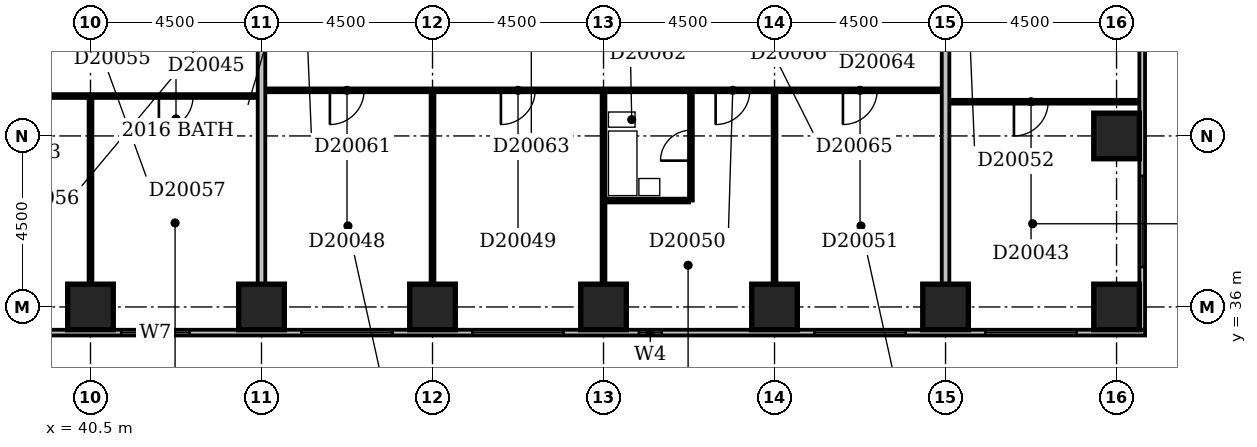
"""IFC4 building model, lengths in metres.
Left out: names, types, materials, properties, quantities, classifications, styles, units other than length and angle.
Written with IfcOpenShell. Run it as: python <this file> out.ifc"""

import sys

from ifc_helpers import new_model, si_unit, direction, frame, frame_2d, origin, origin_2d, place, context, subcontext, project, spatial, rectangle, extrude, element, fill, save


model = new_model("IFC4")
c1 = context("Model", 3, precision=1e-05, world=origin(), true_north=direction((0.0, 1.0)))
c2 = subcontext(c1, "Body", "Model", "MODEL_VIEW")
j1 = project(units=[si_unit("LENGTHUNIT", "METRE"), si_unit("PLANEANGLEUNIT", "RADIAN")], contexts=[c1])
p1 = place(None, origin())
s1 = spatial("IfcSite", under=j1, at=p1, CompositionType="ELEMENT")
p2 = place(p1, origin())
s2 = spatial("IfcBuilding", under=s1, at=p2, CompositionType="ELEMENT")
p3 = place(p2, frame((0.0, 0.0, 83.0)))
s3 = spatial("IfcBuildingStorey", under=s2, at=p3, CompositionType="ELEMENT", Elevation=83.0)
for number, where, z_axis, x_axis in (
    (1, (40.5, 36.0, -0.3), (0.0, 0.0, 1.0), (1.0, 0.0, 0.0)),
    (2, (45.0, 36.0, -0.3), (0.0, 0.0, 1.0), (1.0, 0.0, 0.0)),
    (3, (49.5, 36.0, -0.3), (0.0, 0.0, 1.0), (1.0, 0.0, 0.0)),
    (4, (54.0, 36.0, -0.3), (0.0, 0.0, 1.0), (1.0, 0.0, 0.0)),
    (5, (58.5, 36.0, -0.3), (0.0, 0.0, 1.0), (1.0, 0.0, 0.0)),
    (6, (63.0, 36.0, -0.3), (0.0, 0.0, 1.0), (1.0, 0.0, 0.0)),
    (7, (67.5, 36.0, -0.3), (0.0, 0.0, 1.0), (1.0, 0.0, 0.0)),
    (8, (67.5, 40.5, -0.3), (0.0, 0.0, 1.0), (1.0, 0.0, 0.0)),
):
    element("IfcColumn", number, at=place(p3, frame(where, z_axis=z_axis, x_axis=x_axis)), inside=s3, PredefinedType="COLUMN", context=c2, shape_type="SweptSolid", body=[
        extrude(rectangle(XDim=1.2, YDim=1.2, at=origin_2d()), origin(), (0.0, 0.0, 1.0), 3.6),
    ])
p4 = place(p3, frame((23.1, 35.325, 0.0), z_axis=(0.0, 0.0, 1.0), x_axis=(1.0, 0.0, 0.0)))
e9 = element("IfcWall", 9, at=p4, inside=s3, PredefinedType="STANDARD", context=c2, shape_type="SweptSolid", body=[
    extrude(rectangle(XDim=45.15, YDim=0.15, at=frame_2d((22.575, 0.0))), origin(), (0.0, 0.0, 1.0), 2.7),
])
p5 = place(p4, frame((0.45, 0.0, 0.6)))
e10 = element("IfcOpeningElement", 10, at=p5, cuts=e9, PredefinedType="OPENING", context=c2, shape_type="SweptSolid", body=[
    extrude(rectangle(XDim=2.4, YDim=1.8, at=frame_2d((1.2, 0.9))), frame((0.0, 0.087, 0.0), z_axis=(0.0, -1.0, 0.0), x_axis=(1.0, 0.0, 0.0)), (0.0, 0.0, 1.0), 0.174),
])
p6 = place(p4, frame((6.366, 0.0, 0.6)))
e11 = element("IfcOpeningElement", 11, at=p6, cuts=e9, PredefinedType="OPENING", context=c2, shape_type="SweptSolid", body=[
    extrude(rectangle(XDim=1.2, YDim=1.8, at=frame_2d((0.6, 0.9))), frame((0.0, 0.087, 0.0), z_axis=(0.0, -1.0, 0.0), x_axis=(1.0, 0.0, 0.0)), (0.0, 0.0, 1.0), 0.174),
])
p7 = place(p4, frame((9.45, 0.0, 0.6)))
e12 = element("IfcOpeningElement", 12, at=p7, cuts=e9, PredefinedType="OPENING", context=c2, shape_type="SweptSolid", body=[
    extrude(rectangle(XDim=2.4, YDim=1.8, at=frame_2d((1.2, 0.9))), frame((0.0, 0.087, 0.0), z_axis=(0.0, -1.0, 0.0), x_axis=(1.0, 0.0, 0.0)), (0.0, 0.0, 1.0), 0.174),
])
p8 = place(p4, frame((13.95, 0.0, 0.6)))
e13 = element("IfcOpeningElement", 13, at=p8, cuts=e9, PredefinedType="OPENING", context=c2, shape_type="SweptSolid", body=[
    extrude(rectangle(XDim=2.4, YDim=1.8, at=frame_2d((1.2, 0.9))), frame((0.0, 0.087, 0.0), z_axis=(0.0, -1.0, 0.0), x_axis=(1.0, 0.0, 0.0)), (0.0, 0.0, 1.0), 0.174),
])
p9 = place(p4, frame((18.21, 0.0, 0.6)))
e14 = element("IfcOpeningElement", 14, at=p9, cuts=e9, PredefinedType="OPENING", context=c2, shape_type="SweptSolid", body=[
    extrude(rectangle(XDim=1.8, YDim=1.8, at=frame_2d((0.9, 0.9))), frame((0.0, 0.087, 0.0), z_axis=(0.0, -1.0, 0.0), x_axis=(1.0, 0.0, 0.0)), (0.0, 0.0, 1.0), 0.174),
])
p10 = place(p4, frame((22.95, 0.0, 0.6)))
e15 = element("IfcOpeningElement", 15, at=p10, cuts=e9, PredefinedType="OPENING", context=c2, shape_type="SweptSolid", body=[
    extrude(rectangle(XDim=2.4, YDim=1.8, at=frame_2d((1.2, 0.9))), frame((0.0, 0.087, 0.0), z_axis=(0.0, -1.0, 0.0), x_axis=(1.0, 0.0, 0.0)), (0.0, 0.0, 1.0), 0.174),
])
p11 = place(p4, frame((27.45, 0.0, 0.6)))
e16 = element("IfcOpeningElement", 16, at=p11, cuts=e9, PredefinedType="OPENING", context=c2, shape_type="SweptSolid", body=[
    extrude(rectangle(XDim=2.4, YDim=1.8, at=frame_2d((1.2, 0.9))), frame((0.0, 0.087, 0.0), z_axis=(0.0, -1.0, 0.0), x_axis=(1.0, 0.0, 0.0)), (0.0, 0.0, 1.0), 0.174),
])
p12 = place(p4, frame((31.831, 0.0, 0.6)))
e17 = element("IfcOpeningElement", 17, at=p12, cuts=e9, PredefinedType="OPENING", context=c2, shape_type="SweptSolid", body=[
    extrude(rectangle(XDim=0.6, YDim=1.8, at=frame_2d((0.3, 0.9))), frame((0.0, 0.087, 0.0), z_axis=(0.0, -1.0, 0.0), x_axis=(1.0, 0.0, 0.0)), (0.0, 0.0, 1.0), 0.174),
])
p13 = place(p4, frame((36.45, 0.0, 0.6)))
e18 = element("IfcOpeningElement", 18, at=p13, cuts=e9, PredefinedType="OPENING", context=c2, shape_type="SweptSolid", body=[
    extrude(rectangle(XDim=2.4, YDim=1.8, at=frame_2d((1.2, 0.9))), frame((0.0, 0.087, 0.0), z_axis=(0.0, -1.0, 0.0), x_axis=(1.0, 0.0, 0.0)), (0.0, 0.0, 1.0), 0.174),
])
p14 = place(p4, frame((40.95, 0.0, 0.6)))
e19 = element("IfcOpeningElement", 19, at=p14, cuts=e9, PredefinedType="OPENING", context=c2, shape_type="SweptSolid", body=[
    extrude(rectangle(XDim=2.4, YDim=1.8, at=frame_2d((1.2, 0.9))), frame((0.0, 0.087, 0.0), z_axis=(0.0, -1.0, 0.0), x_axis=(1.0, 0.0, 0.0)), (0.0, 0.0, 1.0), 0.174),
])
p15 = place(p3, frame((68.175, 35.4, 0.0), z_axis=(0.0, 0.0, 1.0), x_axis=(0.0, 1.0, 0.0)))
e20 = element("IfcWall", 20, at=p15, inside=s3, PredefinedType="STANDARD", context=c2, shape_type="SweptSolid", body=[
    extrude(rectangle(XDim=23.85, YDim=0.15, at=frame_2d((11.925, 0.0))), origin(), (0.0, 0.0, 1.0), 2.7),
])
p16 = place(p15, frame((1.65, 0.0, 0.6)))
e21 = element("IfcOpeningElement", 21, at=p16, cuts=e20, PredefinedType="OPENING", context=c2, shape_type="SweptSolid", body=[
    extrude(rectangle(XDim=2.4, YDim=1.8, at=frame_2d((1.2, 0.9))), frame((0.0, 0.087, 0.0), z_axis=(0.0, -1.0, 0.0), x_axis=(1.0, 0.0, 0.0)), (0.0, 0.0, 1.0), 0.174),
])
p17 = place(p3, frame((40.5, 36.6, 0.0), z_axis=(0.0, 0.0, 1.0), x_axis=(0.0, 1.0, 0.0)))
e22 = element("IfcWall", 22, at=p17, inside=s3, PredefinedType="PARTITIONING", context=c2, shape_type="SweptSolid", body=[
    extrude(rectangle(XDim=4.9, YDim=0.1, at=frame_2d((2.45, 0.0))), origin(), (0.0, 0.0, 1.0), 3.3),
])
p18 = place(p3, frame((45.0, 36.6, 0.0), z_axis=(0.0, 0.0, 1.0), x_axis=(0.0, 1.0, 0.0)))
e23 = element("IfcWall", 23, at=p18, inside=s3, PredefinedType="PARTITIONING", context=c2, shape_type="SweptSolid", body=[
    extrude(rectangle(XDim=12.8, YDim=0.2, at=frame_2d((6.4, 0.0))), origin(), (0.0, 0.0, 1.0), 2.6),
])
p19 = place(p3, frame((49.5, 36.6, 0.0), z_axis=(0.0, 0.0, 1.0), x_axis=(0.0, 1.0, 0.0)))
e24 = element("IfcWall", 24, at=p19, inside=s3, PredefinedType="PARTITIONING", context=c2, shape_type="SweptSolid", body=[
    extrude(rectangle(XDim=5.05, YDim=0.1, at=frame_2d((2.525, 0.0))), origin(), (0.0, 0.0, 1.0), 3.3),
])
p20 = place(p3, frame((54.0, 36.6, 0.0), z_axis=(0.0, 0.0, 1.0), x_axis=(0.0, 1.0, 0.0)))
e25 = element("IfcWall", 25, at=p20, inside=s3, PredefinedType="PARTITIONING", context=c2, shape_type="SweptSolid", body=[
    extrude(rectangle(XDim=5.05, YDim=0.1, at=frame_2d((2.525, 0.0))), origin(), (0.0, 0.0, 1.0), 2.6),
])
p21 = place(p3, frame((58.5, 36.6, 0.0), z_axis=(0.0, 0.0, 1.0), x_axis=(0.0, 1.0, 0.0)))
e26 = element("IfcWall", 26, at=p21, inside=s3, PredefinedType="PARTITIONING", context=c2, shape_type="SweptSolid", body=[
    extrude(rectangle(XDim=5.05, YDim=0.1, at=frame_2d((2.525, 0.0))), origin(), (0.0, 0.0, 1.0), 3.3),
])
p22 = place(p3, frame((63.0, 36.6, 0.0), z_axis=(0.0, 0.0, 1.0), x_axis=(0.0, 1.0, 0.0)))
e27 = element("IfcWall", 27, at=p22, inside=s3, PredefinedType="PARTITIONING", context=c2, shape_type="SweptSolid", body=[
    extrude(rectangle(XDim=12.8, YDim=0.2, at=frame_2d((6.4, 0.0))), origin(), (0.0, 0.0, 1.0), 2.4),
])
p23 = place(p3, frame((54.05, 38.8, 0.0), z_axis=(0.0, 0.0, 1.0), x_axis=(1.0, 0.0, 0.0)))
e28 = element("IfcWall", 28, at=p23, inside=s3, PredefinedType="PLUMBINGWALL", context=c2, shape_type="SweptSolid", body=[
    extrude(rectangle(XDim=2.2, YDim=0.1, at=frame_2d((1.1, 0.0))), origin(), (0.0, 0.0, 1.0), 3.3),
])
p24 = place(p3, frame((56.3, 38.8, 0.0), z_axis=(0.0, 0.0, 1.0), x_axis=(0.0, 1.0, 0.0)))
e29 = element("IfcWall", 29, at=p24, inside=s3, PredefinedType="PLUMBINGWALL", context=c2, shape_type="SweptSolid", body=[
    extrude(rectangle(XDim=2.85, YDim=0.1, at=frame_2d((1.425, 0.0))), origin(), (0.0, 0.0, 1.0), 3.3),
])
p25 = place(p24, frame((1.05, 0.0, 0.0)))
e30 = element("IfcOpeningElement", 30, at=p25, cuts=e29, PredefinedType="OPENING", context=c2, shape_type="SweptSolid", body=[
    extrude(rectangle(XDim=0.8, YDim=2.1, at=frame_2d((0.4, 1.05))), frame((0.0, 0.062, 0.0), z_axis=(0.0, -1.0, 0.0), x_axis=(1.0, 0.0, 0.0)), (0.0, 0.0, 1.0), 0.124),
])
p26 = place(p3, frame((63.1, 41.4, 0.0), z_axis=(0.0, 0.0, 1.0), x_axis=(1.0, 0.0, 0.0)))
e31 = element("IfcWall", 31, at=p26, inside=s3, PredefinedType="PARTITIONING", context=c2, shape_type="SweptSolid", body=[
    extrude(rectangle(XDim=5.0, YDim=0.1, at=frame_2d((2.5, 0.0))), origin(), (0.0, 0.0, 1.0), 3.3),
])
p27 = place(p26, frame((1.7, 0.0, 0.0)))
e32 = element("IfcOpeningElement", 32, at=p27, cuts=e31, PredefinedType="OPENING", context=c2, shape_type="SweptSolid", body=[
    extrude(rectangle(XDim=0.9, YDim=2.1, at=frame_2d((0.45, 1.05))), frame((0.0, 0.062, 0.0), z_axis=(0.0, -1.0, 0.0), x_axis=(1.0, 0.0, 0.0)), (0.0, 0.0, 1.0), 0.124),
])
p28 = place(p3, frame((31.6, 41.55, 0.0), z_axis=(0.0, 0.0, 1.0), x_axis=(1.0, 0.0, 0.0)))
e33 = element("IfcWall", 33, at=p28, inside=s3, PredefinedType="PARTITIONING", context=c2, shape_type="SweptSolid", body=[
    extrude(rectangle(XDim=13.3, YDim=0.1, at=frame_2d((6.65, 0.0))), origin(), (0.0, 0.0, 1.0), 3.3),
])
p29 = place(p28, frame((3.9, 0.0, 0.0)))
e34 = element("IfcOpeningElement", 34, at=p29, cuts=e33, PredefinedType="OPENING", context=c2, shape_type="SweptSolid", body=[
    extrude(rectangle(XDim=0.9, YDim=2.1, at=frame_2d((0.45, 1.05))), frame((0.0, 0.062, 0.0), z_axis=(0.0, -1.0, 0.0), x_axis=(1.0, 0.0, 0.0)), (0.0, 0.0, 1.0), 0.124),
])
p30 = place(p28, frame((10.7, 0.0, 0.0)))
e35 = element("IfcOpeningElement", 35, at=p30, cuts=e33, PredefinedType="OPENING", context=c2, shape_type="SweptSolid", body=[
    extrude(rectangle(XDim=0.9, YDim=2.1, at=frame_2d((0.45, 1.05))), frame((0.0, 0.062, 0.0), z_axis=(0.0, -1.0, 0.0), x_axis=(1.0, 0.0, 0.0)), (0.0, 0.0, 1.0), 0.124),
])
p31 = place(p3, frame((45.1, 41.7, 0.0), z_axis=(0.0, 0.0, 1.0), x_axis=(1.0, 0.0, 0.0)))
e36 = element("IfcWall", 36, at=p31, inside=s3, PredefinedType="PARTITIONING", context=c2, shape_type="SweptSolid", body=[
    extrude(rectangle(XDim=17.8, YDim=0.1, at=frame_2d((8.9, 0.0))), origin(), (0.0, 0.0, 1.0), 3.3),
])
p32 = place(p31, frame((1.7, 0.0, 0.0)))
e37 = element("IfcOpeningElement", 37, at=p32, cuts=e36, PredefinedType="OPENING", context=c2, shape_type="SweptSolid", body=[
    extrude(rectangle(XDim=0.9, YDim=2.1, at=frame_2d((0.45, 1.05))), frame((0.0, 0.062, 0.0), z_axis=(0.0, -1.0, 0.0), x_axis=(1.0, 0.0, 0.0)), (0.0, 0.0, 1.0), 0.124),
])
p33 = place(p31, frame((6.2, 0.0, 0.0)))
e38 = element("IfcOpeningElement", 38, at=p33, cuts=e36, PredefinedType="OPENING", context=c2, shape_type="SweptSolid", body=[
    extrude(rectangle(XDim=0.9, YDim=2.1, at=frame_2d((0.45, 1.05))), frame((0.0, 0.062, 0.0), z_axis=(0.0, -1.0, 0.0), x_axis=(1.0, 0.0, 0.0)), (0.0, 0.0, 1.0), 0.124),
])
p34 = place(p31, frame((11.85, 0.0, 0.0)))
e39 = element("IfcOpeningElement", 39, at=p34, cuts=e36, PredefinedType="OPENING", context=c2, shape_type="SweptSolid", body=[
    extrude(rectangle(XDim=0.9, YDim=2.1, at=frame_2d((0.45, 1.05))), frame((0.0, 0.062, 0.0), z_axis=(0.0, -1.0, 0.0), x_axis=(1.0, 0.0, 0.0)), (0.0, 0.0, 1.0), 0.124),
])
p35 = place(p31, frame((15.2, 0.0, 0.0)))
e40 = element("IfcOpeningElement", 40, at=p35, cuts=e36, PredefinedType="OPENING", context=c2, shape_type="SweptSolid", body=[
    extrude(rectangle(XDim=0.9, YDim=2.1, at=frame_2d((0.45, 1.05))), frame((0.0, 0.062, 0.0), z_axis=(0.0, -1.0, 0.0), x_axis=(1.0, 0.0, 0.0)), (0.0, 0.0, 1.0), 0.124),
])
p36 = place(p9, origin())
e41 = element("IfcWindow", 41, at=p36, inside=s3, PartitioningType="SINGLE_PANEL", PredefinedType="WINDOW", context=c2, shape_type="SweptSolid", body=[
    extrude(rectangle(XDim=1.8, YDim=1.8, at=frame_2d((0.9, 0.9))), frame((0.0, 0.03, 0.0), z_axis=(0.0, -1.0, 0.0), x_axis=(1.0, 0.0, 0.0)), (0.0, 0.0, 1.0), 0.06),
])
fill(e14, e41)
p37 = place(p10, origin())
e42 = element("IfcWindow", 42, at=p37, inside=s3, PartitioningType="SINGLE_PANEL", PredefinedType="WINDOW", context=c2, shape_type="SweptSolid", body=[
    extrude(rectangle(XDim=2.4, YDim=1.8, at=frame_2d((1.2, 0.9))), frame((0.0, 0.03, 0.0), z_axis=(0.0, -1.0, 0.0), x_axis=(1.0, 0.0, 0.0)), (0.0, 0.0, 1.0), 0.06),
])
fill(e15, e42)
p38 = place(p11, origin())
e43 = element("IfcWindow", 43, at=p38, inside=s3, PartitioningType="SINGLE_PANEL", PredefinedType="WINDOW", context=c2, shape_type="SweptSolid", body=[
    extrude(rectangle(XDim=2.4, YDim=1.8, at=frame_2d((1.2, 0.9))), frame((0.0, 0.03, 0.0), z_axis=(0.0, -1.0, 0.0), x_axis=(1.0, 0.0, 0.0)), (0.0, 0.0, 1.0), 0.06),
])
fill(e16, e43)
p39 = place(p12, origin())
e44 = element("IfcWindow", 44, at=p39, inside=s3, PartitioningType="SINGLE_PANEL", PredefinedType="WINDOW", context=c2, shape_type="SweptSolid", body=[
    extrude(rectangle(XDim=0.6, YDim=1.8, at=frame_2d((0.3, 0.9))), frame((0.0, 0.03, 0.0), z_axis=(0.0, -1.0, 0.0), x_axis=(1.0, 0.0, 0.0)), (0.0, 0.0, 1.0), 0.06),
])
fill(e17, e44)
p40 = place(p13, origin())
e45 = element("IfcWindow", 45, at=p40, inside=s3, PartitioningType="SINGLE_PANEL", PredefinedType="WINDOW", context=c2, shape_type="SweptSolid", body=[
    extrude(rectangle(XDim=2.4, YDim=1.8, at=frame_2d((1.2, 0.9))), frame((0.0, 0.03, 0.0), z_axis=(0.0, -1.0, 0.0), x_axis=(1.0, 0.0, 0.0)), (0.0, 0.0, 1.0), 0.06),
])
fill(e18, e45)
p41 = place(p14, origin())
e46 = element("IfcWindow", 46, at=p41, inside=s3, PartitioningType="SINGLE_PANEL", PredefinedType="WINDOW", context=c2, shape_type="SweptSolid", body=[
    extrude(rectangle(XDim=2.4, YDim=1.8, at=frame_2d((1.2, 0.9))), frame((0.0, 0.03, 0.0), z_axis=(0.0, -1.0, 0.0), x_axis=(1.0, 0.0, 0.0)), (0.0, 0.0, 1.0), 0.06),
])
fill(e19, e46)
p42 = place(p16, origin())
e47 = element("IfcWindow", 47, at=p42, inside=s3, PartitioningType="SINGLE_PANEL", PredefinedType="WINDOW", context=c2, shape_type="SweptSolid", body=[
    extrude(rectangle(XDim=2.4, YDim=1.8, at=frame_2d((1.2, 0.9))), frame((0.0, 0.03, 0.0), z_axis=(0.0, -1.0, 0.0), x_axis=(1.0, 0.0, 0.0)), (0.0, 0.0, 1.0), 0.06),
])
fill(e21, e47)
p43 = place(p25, origin())
e48 = element("IfcDoor", 48, at=p43, inside=s3, OperationType="SINGLE_SWING_LEFT", PredefinedType="DOOR", context=c2, shape_type="SweptSolid", body=[
    extrude(rectangle(XDim=0.8, YDim=2.1, at=frame_2d((0.4, 1.05))), frame((0.0, 0.025, 0.0), z_axis=(0.0, -1.0, 0.0), x_axis=(1.0, 0.0, 0.0)), (0.0, 0.0, 1.0), 0.05),
])
fill(e30, e48)
p44 = place(p27, frame((0.9, 0.0, 0.0), z_axis=(0.0, 0.0, 1.0), x_axis=(-1.0, 0.0, 0.0)))
e49 = element("IfcDoor", 49, at=p44, inside=s3, OperationType="SINGLE_SWING_RIGHT", PredefinedType="DOOR", context=c2, shape_type="SweptSolid", body=[
    extrude(rectangle(XDim=0.9, YDim=2.1, at=frame_2d((0.45, 1.05))), frame((0.0, 0.025, 0.0), z_axis=(0.0, -1.0, 0.0), x_axis=(1.0, 0.0, 0.0)), (0.0, 0.0, 1.0), 0.05),
])
fill(e32, e49)
p45 = place(p30, frame((0.9, 0.0, 0.0), z_axis=(0.0, 0.0, 1.0), x_axis=(-1.0, 0.0, 0.0)))
e50 = element("IfcDoor", 50, at=p45, inside=s3, OperationType="SINGLE_SWING_RIGHT", PredefinedType="DOOR", context=c2, shape_type="SweptSolid", body=[
    extrude(rectangle(XDim=0.9, YDim=2.1, at=frame_2d((0.45, 1.05))), frame((0.0, 0.025, 0.0), z_axis=(0.0, -1.0, 0.0), x_axis=(1.0, 0.0, 0.0)), (0.0, 0.0, 1.0), 0.05),
])
fill(e35, e50)
p46 = place(p32, frame((0.9, 0.0, 0.0), z_axis=(0.0, 0.0, 1.0), x_axis=(-1.0, 0.0, 0.0)))
e51 = element("IfcDoor", 51, at=p46, inside=s3, OperationType="SINGLE_SWING_RIGHT", PredefinedType="DOOR", context=c2, shape_type="SweptSolid", body=[
    extrude(rectangle(XDim=0.9, YDim=2.1, at=frame_2d((0.45, 1.05))), frame((0.0, 0.025, 0.0), z_axis=(0.0, -1.0, 0.0), x_axis=(1.0, 0.0, 0.0)), (0.0, 0.0, 1.0), 0.05),
])
fill(e37, e51)
p47 = place(p33, frame((0.9, 0.0, 0.0), z_axis=(0.0, 0.0, 1.0), x_axis=(-1.0, 0.0, 0.0)))
e52 = element("IfcDoor", 52, at=p47, inside=s3, OperationType="SINGLE_SWING_RIGHT", PredefinedType="DOOR", context=c2, shape_type="SweptSolid", body=[
    extrude(rectangle(XDim=0.9, YDim=2.1, at=frame_2d((0.45, 1.05))), frame((0.0, 0.025, 0.0), z_axis=(0.0, -1.0, 0.0), x_axis=(1.0, 0.0, 0.0)), (0.0, 0.0, 1.0), 0.05),
])
fill(e38, e52)
p48 = place(p34, frame((0.9, 0.0, 0.0), z_axis=(0.0, 0.0, 1.0), x_axis=(-1.0, 0.0, 0.0)))
e53 = element("IfcDoor", 53, at=p48, inside=s3, OperationType="SINGLE_SWING_RIGHT", PredefinedType="DOOR", context=c2, shape_type="SweptSolid", body=[
    extrude(rectangle(XDim=0.9, YDim=2.1, at=frame_2d((0.45, 1.05))), frame((0.0, 0.025, 0.0), z_axis=(0.0, -1.0, 0.0), x_axis=(1.0, 0.0, 0.0)), (0.0, 0.0, 1.0), 0.05),
])
fill(e39, e53)
p49 = place(p35, frame((0.9, 0.0, 0.0), z_axis=(0.0, 0.0, 1.0), x_axis=(-1.0, 0.0, 0.0)))
e54 = element("IfcDoor", 54, at=p49, inside=s3, OperationType="SINGLE_SWING_RIGHT", PredefinedType="DOOR", context=c2, shape_type="SweptSolid", body=[
    extrude(rectangle(XDim=0.9, YDim=2.1, at=frame_2d((0.45, 1.05))), frame((0.0, 0.025, 0.0), z_axis=(0.0, -1.0, 0.0), x_axis=(1.0, 0.0, 0.0)), (0.0, 0.0, 1.0), 0.05),
])
fill(e40, e54)
save(model, sys.argv[1])
